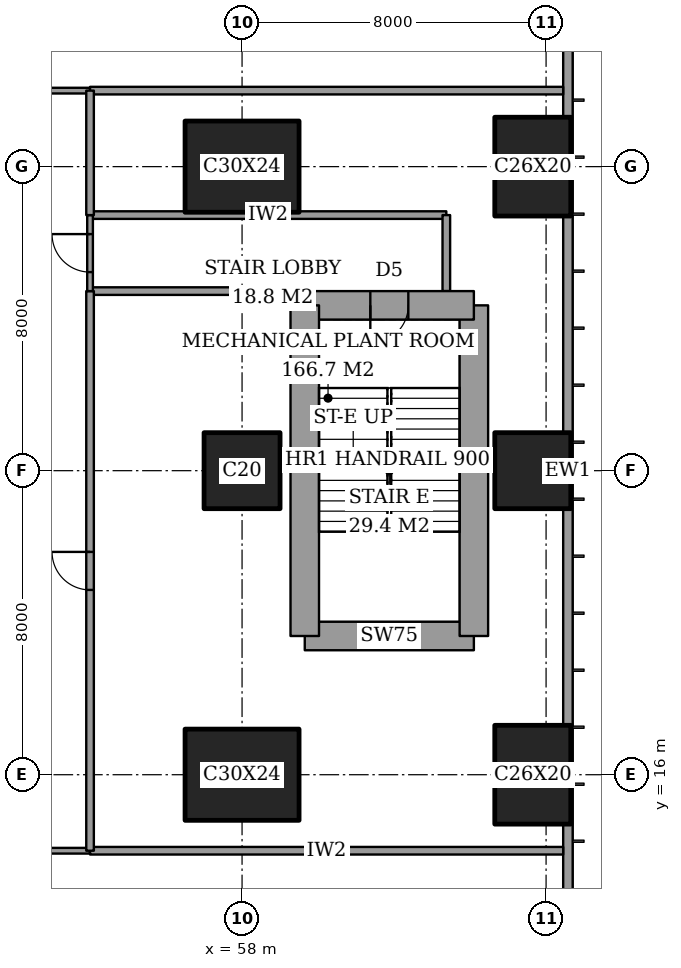
"""IFC4 building model, lengths in metres.
Left out: names, types, materials, properties, quantities, classifications, styles, units other than length and angle.
Written with IfcOpenShell. Run it as: python <this file> out.ifc"""

import sys

from ifc_helpers import new_model, si_unit, direction, frame, frame_2d, origin, origin_2d, place, context, subcontext, project, spatial, rectangle, extrude, element, fill, save


model = new_model("IFC4")
c1 = context("Model", 3, precision=1e-05, world=origin(), true_north=direction((0.0, 1.0)))
c2 = subcontext(c1, "Body", "Model", "MODEL_VIEW")
j1 = project(units=[si_unit("LENGTHUNIT", "METRE"), si_unit("PLANEANGLEUNIT", "RADIAN")], contexts=[c1])
p1 = place(None, origin())
s1 = spatial("IfcSite", under=j1, at=p1, CompositionType="ELEMENT")
p2 = place(p1, origin())
s2 = spatial("IfcBuilding", under=s1, at=p2, CompositionType="ELEMENT")
p3 = place(p2, frame((0.0, 0.0, 90.8)))
s3 = spatial("IfcBuildingStorey", under=s2, at=p3, CompositionType="ELEMENT", Elevation=90.8)
p4 = place(p3, frame((58.0, 16.0, 0.0), z_axis=(0.0, 0.0, 1.0), x_axis=(1.0, 0.0, 0.0)))
e1 = element("IfcColumn", 1, at=p4, inside=s3, PredefinedType="COLUMN", context=c2, shape_type="SweptSolid", body=[
    extrude(rectangle(XDim=3.0, YDim=2.4, at=origin_2d()), origin(), (0.0, 0.0, 1.0), 5.4),
])
p5 = place(p3, frame((58.0, 24.0, 0.0), z_axis=(0.0, 0.0, 1.0), x_axis=(1.0, 0.0, 0.0)))
e2 = element("IfcColumn", 2, at=p5, inside=s3, PredefinedType="COLUMN", context=c2, shape_type="SweptSolid", body=[
    extrude(rectangle(XDim=2.0, YDim=2.0, at=origin_2d()), origin(), (0.0, 0.0, 1.0), 5.4),
])
p6 = place(p3, frame((58.0, 32.0, 0.0), z_axis=(0.0, 0.0, 1.0), x_axis=(1.0, 0.0, 0.0)))
e3 = element("IfcColumn", 3, at=p6, inside=s3, PredefinedType="COLUMN", context=c2, shape_type="SweptSolid", body=[
    extrude(rectangle(XDim=3.0, YDim=2.4, at=origin_2d()), origin(), (0.0, 0.0, 1.0), 5.4),
])
p7 = place(p3, frame((65.65, 16.0, 0.0), z_axis=(0.0, 0.0, 1.0), x_axis=(0.0, 1.0, 0.0)))
e4 = element("IfcColumn", 4, at=p7, inside=s3, PredefinedType="COLUMN", context=c2, shape_type="SweptSolid", body=[
    extrude(rectangle(XDim=2.6, YDim=2.0, at=origin_2d()), origin(), (0.0, 0.0, 1.0), 5.4),
])
p8 = place(p3, frame((65.65, 24.0, 0.0), z_axis=(0.0, 0.0, 1.0), x_axis=(1.0, 0.0, 0.0)))
e5 = element("IfcColumn", 5, at=p8, inside=s3, PredefinedType="COLUMN", context=c2, shape_type="SweptSolid", body=[
    extrude(rectangle(XDim=2.0, YDim=2.0, at=origin_2d()), origin(), (0.0, 0.0, 1.0), 5.4),
])
p9 = place(p3, frame((65.65, 32.0, 0.0), z_axis=(0.0, 0.0, 1.0), x_axis=(0.0, 1.0, 0.0)))
e6 = element("IfcColumn", 6, at=p9, inside=s3, PredefinedType="COLUMN", context=c2, shape_type="SweptSolid", body=[
    extrude(rectangle(XDim=2.6, YDim=2.0, at=origin_2d()), origin(), (0.0, 0.0, 1.0), 5.4),
])
p10 = place(p3, frame((59.65, 19.65, 0.0), z_axis=(0.0, 0.0, 1.0), x_axis=(1.0, 0.0, 0.0)))
e7 = element("IfcWall", 7, at=p10, inside=s3, PredefinedType="SHEAR", context=c2, shape_type="SweptSolid", body=[
    extrude(rectangle(XDim=4.45, YDim=0.75, at=frame_2d((2.225, 0.0))), origin(), (0.0, 0.0, 1.0), 5.4),
])
p11 = place(p3, frame((64.1, 19.65, 0.0), z_axis=(0.0, 0.0, 1.0), x_axis=(0.0, 1.0, 0.0)))
e8 = element("IfcWall", 8, at=p11, inside=s3, PredefinedType="SHEAR", context=c2, shape_type="SweptSolid", body=[
    extrude(rectangle(XDim=8.7, YDim=0.75, at=frame_2d((4.35, 0.0))), origin(), (0.0, 0.0, 1.0), 5.4),
])
p12 = place(p3, frame((64.1, 28.35, 0.0), z_axis=(0.0, 0.0, 1.0), x_axis=(-1.0, 0.0, 0.0)))
e9 = element("IfcWall", 9, at=p12, inside=s3, PredefinedType="SHEAR", context=c2, shape_type="SweptSolid", body=[
    extrude(rectangle(XDim=4.45, YDim=0.75, at=frame_2d((2.225, 0.0))), origin(), (0.0, 0.0, 1.0), 5.4),
])
p13 = place(p12, frame((1.725, 0.0, 0.0)))
e10 = element("IfcOpeningElement", 10, at=p13, cuts=e9, PredefinedType="OPENING", context=c2, shape_type="SweptSolid", body=[
    extrude(rectangle(XDim=1.0, YDim=2.1, at=frame_2d((0.5, 1.05))), frame((0.0, 0.385, 0.0), z_axis=(0.0, -1.0, 0.0), x_axis=(1.0, 0.0, 0.0)), (0.0, 0.0, 1.0), 0.77),
])
p14 = place(p3, frame((59.65, 28.35, 0.0), z_axis=(0.0, 0.0, 1.0), x_axis=(0.0, -1.0, 0.0)))
e11 = element("IfcWall", 11, at=p14, inside=s3, PredefinedType="SHEAR", context=c2, shape_type="SweptSolid", body=[
    extrude(rectangle(XDim=8.7, YDim=0.75, at=frame_2d((4.35, 0.0))), origin(), (0.0, 0.0, 1.0), 5.4),
])
p15 = place(p3, frame((66.575, 3.175, 0.0), z_axis=(0.0, 0.0, 1.0), x_axis=(0.0, 1.0, 0.0)))
e12 = element("IfcWall", 12, at=p15, inside=s3, PredefinedType="SOLIDWALL", context=c2, shape_type="SweptSolid", body=[
    extrude(rectangle(XDim=41.65, YDim=0.25, at=frame_2d((20.825, 0.0))), origin(), (0.0, 0.0, 1.0), 5.4),
])
p16 = place(p15, frame((0.775, 0.0, 0.9)))
e13 = element("IfcOpeningElement", 13, at=p16, cuts=e12, PredefinedType="OPENING", context=c2, shape_type="SweptSolid", body=[
    extrude(rectangle(XDim=2.4, YDim=2.4, at=frame_2d((1.2, 1.2))), frame((0.0, 0.135, 0.0), z_axis=(0.0, -1.0, 0.0), x_axis=(1.0, 0.0, 0.0)), (0.0, 0.0, 1.0), 0.27),
])
p17 = place(p15, frame((38.475, 0.0, 0.9)))
e14 = element("IfcOpeningElement", 14, at=p17, cuts=e12, PredefinedType="OPENING", context=c2, shape_type="SweptSolid", body=[
    extrude(rectangle(XDim=2.4, YDim=2.4, at=frame_2d((1.2, 1.2))), frame((0.0, 0.135, 0.0), z_axis=(0.0, -1.0, 0.0), x_axis=(1.0, 0.0, 0.0)), (0.0, 0.0, 1.0), 0.27),
])
p18 = place(p3, frame((54.0, 14.0, 0.0), z_axis=(0.0, 0.0, 1.0), x_axis=(1.0, 0.0, 0.0)))
e15 = element("IfcWall", 15, at=p18, inside=s3, PredefinedType="PARTITIONING", context=c2, shape_type="SweptSolid", body=[
    extrude(rectangle(XDim=12.45, YDim=0.2, at=frame_2d((6.225, 0.0))), origin(), (0.0, 0.0, 1.0), 5.15),
])
p19 = place(p3, frame((42.0, 14.0, 0.0), z_axis=(0.0, 0.0, 1.0), x_axis=(1.0, 0.0, 0.0)))
e16 = element("IfcWall", 16, at=p19, inside=s3, PredefinedType="PARTITIONING", context=c2, shape_type="SweptSolid", body=[
    extrude(rectangle(XDim=12.0, YDim=0.15, at=frame_2d((6.0, 0.0))), origin(), (0.0, 0.0, 1.0), 5.15),
])
p20 = place(p19, frame((9.55, 0.0, 0.0)))
e17 = element("IfcOpeningElement", 17, at=p20, cuts=e16, PredefinedType="OPENING", context=c2, shape_type="SweptSolid", body=[
    extrude(rectangle(XDim=1.0, YDim=2.1, at=frame_2d((0.5, 1.05))), frame((0.0, 0.085, 0.0), z_axis=(0.0, -1.0, 0.0), x_axis=(1.0, 0.0, 0.0)), (0.0, 0.0, 1.0), 0.17),
])
p21 = place(p3, frame((54.0, 28.725, 0.0), z_axis=(0.0, 0.0, 1.0), x_axis=(1.0, 0.0, 0.0)))
e18 = element("IfcWall", 18, at=p21, inside=s3, PredefinedType="PARTITIONING", context=c2, shape_type="SweptSolid", body=[
    extrude(rectangle(XDim=5.65, YDim=0.2, at=frame_2d((2.825, 0.0))), origin(), (0.0, 0.0, 1.0), 5.15),
])
p22 = place(p3, frame((54.0, 30.725, 0.0), z_axis=(0.0, 0.0, 1.0), x_axis=(1.0, 0.0, 0.0)))
e19 = element("IfcWall", 19, at=p22, inside=s3, PredefinedType="PARTITIONING", context=c2, shape_type="SweptSolid", body=[
    extrude(rectangle(XDim=9.375, YDim=0.2, at=frame_2d((4.688, 0.0))), origin(), (0.0, 0.0, 1.0), 5.15),
])
p23 = place(p3, frame((54.0, 34.0, 0.0), z_axis=(0.0, 0.0, 1.0), x_axis=(1.0, 0.0, 0.0)))
e20 = element("IfcWall", 20, at=p23, inside=s3, PredefinedType="PARTITIONING", context=c2, shape_type="SweptSolid", body=[
    extrude(rectangle(XDim=12.45, YDim=0.2, at=frame_2d((6.225, 0.0))), origin(), (0.0, 0.0, 1.0), 5.15),
])
p24 = place(p3, frame((42.0, 34.0, 0.0), z_axis=(0.0, 0.0, 1.0), x_axis=(1.0, 0.0, 0.0)))
e21 = element("IfcWall", 21, at=p24, inside=s3, PredefinedType="PARTITIONING", context=c2, shape_type="SweptSolid", body=[
    extrude(rectangle(XDim=12.0, YDim=0.15, at=frame_2d((6.0, 0.0))), origin(), (0.0, 0.0, 1.0), 5.15),
])
p25 = place(p24, frame((9.35, 0.0, 0.0)))
e22 = element("IfcOpeningElement", 22, at=p25, cuts=e21, PredefinedType="OPENING", context=c2, shape_type="SweptSolid", body=[
    extrude(rectangle(XDim=1.0, YDim=2.1, at=frame_2d((0.5, 1.05))), frame((0.0, 0.085, 0.0), z_axis=(0.0, -1.0, 0.0), x_axis=(1.0, 0.0, 0.0)), (0.0, 0.0, 1.0), 0.17),
])
p26 = place(p3, frame((54.0, 14.0, 0.0), z_axis=(0.0, 0.0, 1.0), x_axis=(0.0, 1.0, 0.0)))
e23 = element("IfcWall", 23, at=p26, inside=s3, PredefinedType="PARTITIONING", context=c2, shape_type="SweptSolid", body=[
    extrude(rectangle(XDim=14.725, YDim=0.2, at=frame_2d((7.363, 0.0))), origin(), (0.0, 0.0, 1.0), 5.15),
])
p27 = place(p26, frame((6.863, 0.0, 0.0)))
e24 = element("IfcOpeningElement", 24, at=p27, cuts=e23, PredefinedType="OPENING", context=c2, shape_type="SweptSolid", body=[
    extrude(rectangle(XDim=1.0, YDim=2.1, at=frame_2d((0.5, 1.05))), frame((0.0, 0.11, 0.0), z_axis=(0.0, -1.0, 0.0), x_axis=(1.0, 0.0, 0.0)), (0.0, 0.0, 1.0), 0.22),
])
p28 = place(p3, frame((54.0, 30.725, 0.0), z_axis=(0.0, 0.0, 1.0), x_axis=(0.0, 1.0, 0.0)))
e25 = element("IfcWall", 25, at=p28, inside=s3, PredefinedType="PARTITIONING", context=c2, shape_type="SweptSolid", body=[
    extrude(rectangle(XDim=3.275, YDim=0.2, at=frame_2d((1.637, 0.0))), origin(), (0.0, 0.0, 1.0), 5.15),
])
p29 = place(p3, frame((54.0, 28.725, 0.0), z_axis=(0.0, 0.0, 1.0), x_axis=(0.0, 1.0, 0.0)))
e26 = element("IfcWall", 26, at=p29, inside=s3, PredefinedType="PARTITIONING", context=c2, shape_type="SweptSolid", body=[
    extrude(rectangle(XDim=2.0, YDim=0.15, at=frame_2d((1.0, 0.0))), origin(), (0.0, 0.0, 1.0), 5.15),
])
p30 = place(p29, frame((0.5, 0.0, 0.0)))
e27 = element("IfcOpeningElement", 27, at=p30, cuts=e26, PredefinedType="OPENING", context=c2, shape_type="SweptSolid", body=[
    extrude(rectangle(XDim=1.0, YDim=2.1, at=frame_2d((0.5, 1.05))), frame((0.0, 0.085, 0.0), z_axis=(0.0, -1.0, 0.0), x_axis=(1.0, 0.0, 0.0)), (0.0, 0.0, 1.0), 0.17),
])
p31 = place(p3, frame((63.375, 28.725, 0.0), z_axis=(0.0, 0.0, 1.0), x_axis=(0.0, 1.0, 0.0)))
e28 = element("IfcWall", 28, at=p31, inside=s3, PredefinedType="PARTITIONING", context=c2, shape_type="SweptSolid", body=[
    extrude(rectangle(XDim=2.0, YDim=0.2, at=frame_2d((1.0, 0.0))), origin(), (0.0, 0.0, 1.0), 5.15),
])
p32 = place(p27, origin())
e29 = element("IfcDoor", 29, at=p32, inside=s3, OperationType="SINGLE_SWING_LEFT", PredefinedType="DOOR", context=c2, shape_type="SweptSolid", body=[
    extrude(rectangle(XDim=1.0, YDim=2.1, at=frame_2d((0.5, 1.05))), frame((0.0, 0.025, 0.0), z_axis=(0.0, -1.0, 0.0), x_axis=(1.0, 0.0, 0.0)), (0.0, 0.0, 1.0), 0.05),
])
fill(e24, e29)
p33 = place(p30, origin())
e30 = element("IfcDoor", 30, at=p33, inside=s3, OperationType="SINGLE_SWING_LEFT", PredefinedType="DOOR", context=c2, shape_type="SweptSolid", body=[
    extrude(rectangle(XDim=1.0, YDim=2.1, at=frame_2d((0.5, 1.05))), frame((0.0, 0.025, 0.0), z_axis=(0.0, -1.0, 0.0), x_axis=(1.0, 0.0, 0.0)), (0.0, 0.0, 1.0), 0.05),
])
fill(e27, e30)
p34 = place(p13, origin())
e31 = element("IfcDoor", 31, at=p34, inside=s3, OperationType="SINGLE_SWING_LEFT", PredefinedType="DOOR", context=c2, shape_type="SweptSolid", body=[
    extrude(rectangle(XDim=1.0, YDim=2.1, at=frame_2d((0.5, 1.05))), frame((0.0, 0.025, 0.0), z_axis=(0.0, -1.0, 0.0), x_axis=(1.0, 0.0, 0.0)), (0.0, 0.0, 1.0), 0.05),
])
fill(e10, e31)
save(model, sys.argv[1])
